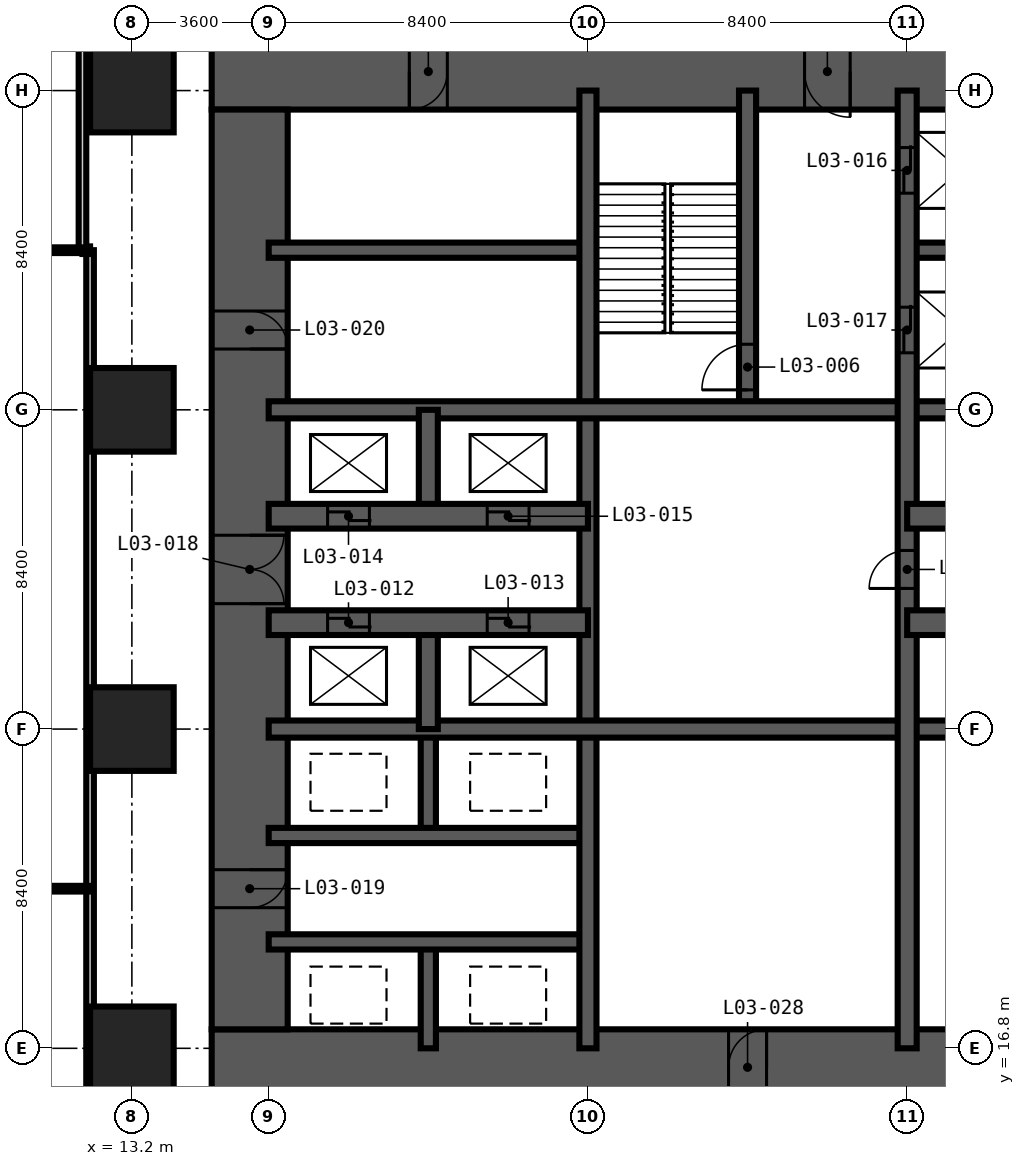
"""IFC4 building model, lengths in metres.
Left out: names, types, materials, properties, quantities, classifications, styles, units other than length and angle.
Written with IfcOpenShell. Run it as: python <this file> out.ifc"""

import sys

from ifc_helpers import new_model, si_unit, direction, frame, frame_2d, origin, origin_2d, place, context, subcontext, project, spatial, rectangle, extrude, element, fill, save


model = new_model("IFC4")
c1 = context("Model", 3, precision=1e-05, world=origin(), true_north=direction((0.0, 1.0)))
c2 = subcontext(c1, "Body", "Model", "MODEL_VIEW")
j1 = project(units=[si_unit("LENGTHUNIT", "METRE"), si_unit("PLANEANGLEUNIT", "RADIAN")], contexts=[c1])
p1 = place(None, origin())
s1 = spatial("IfcSite", under=j1, at=p1, CompositionType="ELEMENT")
p2 = place(p1, origin())
s2 = spatial("IfcBuilding", under=s1, at=p2, CompositionType="ELEMENT")
p3 = place(p2, frame((0.0, 0.0, 17.0)))
s3 = spatial("IfcBuildingStorey", under=s2, at=p3, CompositionType="ELEMENT", Elevation=17.0)
for number, where, z_axis, x_axis in (
    (1, (13.2, 16.8, -0.3), (0.0, 0.0, 1.0), (1.0, 0.0, 0.0)),
    (2, (13.2, 25.2, -0.3), (0.0, 0.0, 1.0), (1.0, 0.0, 0.0)),
    (3, (13.2, 33.6, -0.3), (0.0, 0.0, 1.0), (1.0, 0.0, 0.0)),
    (4, (13.2, 42.0, -0.3), (0.0, 0.0, 1.0), (1.0, 0.0, 0.0)),
):
    element("IfcColumn", number, at=place(p3, frame(where, z_axis=z_axis, x_axis=x_axis)), inside=s3, PredefinedType="COLUMN", context=c2, shape_type="SweptSolid", body=[
        extrude(rectangle(XDim=2.2, YDim=2.2, at=origin_2d()), origin(), (0.0, 0.0, 1.0), 4.95),
    ])
p4 = place(p3, frame((15.3, 16.3, -0.3), z_axis=(0.0, 0.0, 1.0), x_axis=(1.0, 0.0, 0.0)))
e5 = element("IfcWall", 5, at=p4, inside=s3, PredefinedType="SHEAR", context=c2, shape_type="SweptSolid", body=[
    extrude(rectangle(XDim=28.2, YDim=2.0, at=frame_2d((14.1, 0.0))), origin(), (0.0, 0.0, 1.0), 4.95),
])
p5 = place(p4, frame((13.6, 0.0, 0.3)))
e6 = element("IfcOpeningElement", 6, at=p5, cuts=e5, PredefinedType="OPENING", context=c2, shape_type="SweptSolid", body=[
    extrude(rectangle(XDim=1.0, YDim=2.1, at=frame_2d((0.5, 1.05))), frame((0.0, 1.01, 0.0), z_axis=(0.0, -1.0, 0.0), x_axis=(1.0, 0.0, 0.0)), (0.0, 0.0, 1.0), 2.02),
])
p6 = place(p4, frame((19.9, 0.0, 0.3)))
e7 = element("IfcOpeningElement", 7, at=p6, cuts=e5, PredefinedType="OPENING", context=c2, shape_type="SweptSolid", body=[
    extrude(rectangle(XDim=1.0, YDim=2.1, at=frame_2d((0.5, 1.05))), frame((0.0, 1.01, 0.0), z_axis=(0.0, -1.0, 0.0), x_axis=(1.0, 0.0, 0.0)), (0.0, 0.0, 1.0), 2.02),
])
p7 = place(p3, frame((43.5, 42.5, -0.3), z_axis=(0.0, 0.0, 1.0), x_axis=(-1.0, 0.0, 0.0)))
e8 = element("IfcWall", 8, at=p7, inside=s3, PredefinedType="SHEAR", context=c2, shape_type="SweptSolid", body=[
    extrude(rectangle(XDim=28.2, YDim=2.0, at=frame_2d((14.1, 0.0))), origin(), (0.0, 0.0, 1.0), 4.95),
])
p8 = place(p7, frame((22.0, 0.0, 0.3)))
e9 = element("IfcOpeningElement", 9, at=p8, cuts=e8, PredefinedType="OPENING", context=c2, shape_type="SweptSolid", body=[
    extrude(rectangle(XDim=1.0, YDim=2.1, at=frame_2d((0.5, 1.05))), frame((0.0, 1.01, 0.0), z_axis=(0.0, -1.0, 0.0), x_axis=(1.0, 0.0, 0.0)), (0.0, 0.0, 1.0), 2.02),
])
p9 = place(p7, frame((11.4, 0.0, 0.3)))
e10 = element("IfcOpeningElement", 10, at=p9, cuts=e8, PredefinedType="OPENING", context=c2, shape_type="SweptSolid", body=[
    extrude(rectangle(XDim=1.2, YDim=2.2, at=frame_2d((0.6, 1.1))), frame((0.0, 1.01, 0.0), z_axis=(0.0, -1.0, 0.0), x_axis=(1.0, 0.0, 0.0)), (0.0, 0.0, 1.0), 2.02),
])
p10 = place(p3, frame((16.3, 41.5, -0.3), z_axis=(0.0, 0.0, 1.0), x_axis=(0.0, -1.0, 0.0)))
e11 = element("IfcWall", 11, at=p10, inside=s3, PredefinedType="SHEAR", context=c2, shape_type="SweptSolid", body=[
    extrude(rectangle(XDim=24.2, YDim=2.0, at=frame_2d((12.1, 0.0))), origin(), (0.0, 0.0, 1.0), 4.95),
])
p11 = place(p10, frame((11.2, 0.0, 0.3)))
e12 = element("IfcOpeningElement", 12, at=p11, cuts=e11, PredefinedType="OPENING", context=c2, shape_type="SweptSolid", body=[
    extrude(rectangle(XDim=1.8, YDim=2.2, at=frame_2d((0.9, 1.1))), frame((0.0, 1.01, 0.0), z_axis=(0.0, -1.0, 0.0), x_axis=(1.0, 0.0, 0.0)), (0.0, 0.0, 1.0), 2.02),
])
p12 = place(p10, frame((20.0, 0.0, 0.3)))
e13 = element("IfcOpeningElement", 13, at=p12, cuts=e11, PredefinedType="OPENING", context=c2, shape_type="SweptSolid", body=[
    extrude(rectangle(XDim=1.0, YDim=2.1, at=frame_2d((0.5, 1.05))), frame((0.0, 1.01, 0.0), z_axis=(0.0, -1.0, 0.0), x_axis=(1.0, 0.0, 0.0)), (0.0, 0.0, 1.0), 2.02),
])
p13 = place(p10, frame((5.3, 0.0, 0.3)))
e14 = element("IfcOpeningElement", 14, at=p13, cuts=e11, PredefinedType="OPENING", context=c2, shape_type="SweptSolid", body=[
    extrude(rectangle(XDim=1.0, YDim=2.1, at=frame_2d((0.5, 1.05))), frame((0.0, 1.01, 0.0), z_axis=(0.0, -1.0, 0.0), x_axis=(1.0, 0.0, 0.0)), (0.0, 0.0, 1.0), 2.02),
])
for number, where, z_axis, x_axis in (
    (15, (21.0, 16.8, -0.3), (0.0, 0.0, 1.0), (0.0, 1.0, 0.0)),
    (16, (21.0, 22.4, -0.3), (0.0, 0.0, 1.0), (0.0, 1.0, 0.0)),
):
    element("IfcWall", number, at=place(p3, frame(where, z_axis=z_axis, x_axis=x_axis)), inside=s3, PredefinedType="SHEAR", context=c2, shape_type="SweptSolid", body=[
        extrude(rectangle(XDim=2.8, YDim=0.4, at=frame_2d((1.4, 0.0))), origin(), (0.0, 0.0, 1.0), 4.95),
    ])
for number, where, z_axis, x_axis in (
    (17, (16.8, 19.6, -0.3), (0.0, 0.0, 1.0), (1.0, 0.0, 0.0)),
    (18, (16.8, 22.4, -0.3), (0.0, 0.0, 1.0), (1.0, 0.0, 0.0)),
    (19, (16.8, 37.8, -0.3), (0.0, 0.0, 1.0), (1.0, 0.0, 0.0)),
):
    element("IfcWall", number, at=place(p3, frame(where, z_axis=z_axis, x_axis=x_axis)), inside=s3, PredefinedType="SHEAR", context=c2, shape_type="SweptSolid", body=[
        extrude(rectangle(XDim=8.4, YDim=0.4, at=frame_2d((4.2, 0.0))), origin(), (0.0, 0.0, 1.0), 4.95),
    ])
p14 = place(p3, frame((33.6, 37.8, -0.3), z_axis=(0.0, 0.0, 1.0), x_axis=(1.0, 0.0, 0.0)))
e20 = element("IfcWall", 20, at=p14, inside=s3, PredefinedType="SHEAR", context=c2, shape_type="SweptSolid", body=[
    extrude(rectangle(XDim=2.8, YDim=0.4, at=frame_2d((1.4, 0.0))), origin(), (0.0, 0.0, 1.0), 4.95),
])
p15 = place(p3, frame((25.2, 16.8, -0.3), z_axis=(0.0, 0.0, 1.0), x_axis=(0.0, 1.0, 0.0)))
e21 = element("IfcWall", 21, at=p15, inside=s3, PredefinedType="SHEAR", context=c2, shape_type="SweptSolid", body=[
    extrude(rectangle(XDim=25.2, YDim=0.45, at=frame_2d((12.6, 0.0))), origin(), (0.0, 0.0, 1.0), 4.95),
])
p16 = place(p3, frame((29.4, 33.6, -0.3), z_axis=(0.0, 0.0, 1.0), x_axis=(0.0, 1.0, 0.0)))
e22 = element("IfcWall", 22, at=p16, inside=s3, PredefinedType="SHEAR", context=c2, shape_type="SweptSolid", body=[
    extrude(rectangle(XDim=8.4, YDim=0.45, at=frame_2d((4.2, 0.0))), origin(), (0.0, 0.0, 1.0), 4.95),
])
p17 = place(p16, frame((0.525, 0.0, 0.3)))
e23 = element("IfcOpeningElement", 23, at=p17, cuts=e22, PredefinedType="OPENING", context=c2, shape_type="SweptSolid", body=[
    extrude(rectangle(XDim=1.2, YDim=2.2, at=frame_2d((0.6, 1.1))), frame((0.0, 0.235, 0.0), z_axis=(0.0, -1.0, 0.0), x_axis=(1.0, 0.0, 0.0)), (0.0, 0.0, 1.0), 0.47),
])
for number, where, z_axis, x_axis in (
    (24, (16.8, 25.2, -0.3), (0.0, 0.0, 1.0), (1.0, 0.0, 0.0)),
    (25, (16.8, 33.6, -0.3), (0.0, 0.0, 1.0), (1.0, 0.0, 0.0)),
):
    element("IfcWall", number, at=place(p3, frame(where, z_axis=z_axis, x_axis=x_axis)), inside=s3, PredefinedType="SHEAR", context=c2, shape_type="SweptSolid", body=[
        extrude(rectangle(XDim=25.2, YDim=0.45, at=frame_2d((12.6, 0.0))), origin(), (0.0, 0.0, 1.0), 4.95),
    ])
for number, where, z_axis, x_axis in (
    (26, (21.0, 25.2, -0.3), (0.0, 0.0, 1.0), (0.0, 1.0, 0.0)),
    (27, (21.0, 30.8, -0.3), (0.0, 0.0, 1.0), (0.0, 1.0, 0.0)),
):
    element("IfcWall", number, at=place(p3, frame(where, z_axis=z_axis, x_axis=x_axis)), inside=s3, PredefinedType="SHEAR", context=c2, shape_type="SweptSolid", body=[
        extrude(rectangle(XDim=2.8, YDim=0.5, at=frame_2d((1.4, 0.0))), origin(), (0.0, 0.0, 1.0), 4.95),
    ])
p18 = place(p3, frame((33.6, 16.8, -0.3), z_axis=(0.0, 0.0, 1.0), x_axis=(0.0, 1.0, 0.0)))
e28 = element("IfcWall", 28, at=p18, inside=s3, PredefinedType="SHEAR", context=c2, shape_type="SweptSolid", body=[
    extrude(rectangle(XDim=25.2, YDim=0.5, at=frame_2d((12.6, 0.0))), origin(), (0.0, 0.0, 1.0), 4.95),
])
p19 = place(p18, frame((22.5, 0.0, 0.3)))
e29 = element("IfcOpeningElement", 29, at=p19, cuts=e28, PredefinedType="OPENING", context=c2, shape_type="SweptSolid", body=[
    extrude(rectangle(XDim=1.2, YDim=2.2, at=frame_2d((0.6, 1.1))), frame((0.0, 0.26, 0.0), z_axis=(0.0, -1.0, 0.0), x_axis=(1.0, 0.0, 0.0)), (0.0, 0.0, 1.0), 0.52),
])
p20 = place(p18, frame((18.3, 0.0, 0.3)))
e30 = element("IfcOpeningElement", 30, at=p20, cuts=e28, PredefinedType="OPENING", context=c2, shape_type="SweptSolid", body=[
    extrude(rectangle(XDim=1.2, YDim=2.2, at=frame_2d((0.6, 1.1))), frame((0.0, 0.26, 0.0), z_axis=(0.0, -1.0, 0.0), x_axis=(1.0, 0.0, 0.0)), (0.0, 0.0, 1.0), 0.52),
])
p21 = place(p18, frame((12.1, 0.0, 0.3)))
e31 = element("IfcOpeningElement", 31, at=p21, cuts=e28, PredefinedType="OPENING", context=c2, shape_type="SweptSolid", body=[
    extrude(rectangle(XDim=1.0, YDim=2.1, at=frame_2d((0.5, 1.05))), frame((0.0, 0.26, 0.0), z_axis=(0.0, -1.0, 0.0), x_axis=(1.0, 0.0, 0.0)), (0.0, 0.0, 1.0), 0.52),
])
p22 = place(p3, frame((16.8, 28.0, -0.3), z_axis=(0.0, 0.0, 1.0), x_axis=(1.0, 0.0, 0.0)))
e32 = element("IfcWall", 32, at=p22, inside=s3, PredefinedType="SHEAR", context=c2, shape_type="SweptSolid", body=[
    extrude(rectangle(XDim=8.4, YDim=0.65, at=frame_2d((4.2, 0.0))), origin(), (0.0, 0.0, 1.0), 4.95),
])
p23 = place(p22, frame((1.55, 0.0, 0.3)))
e33 = element("IfcOpeningElement", 33, at=p23, cuts=e32, PredefinedType="OPENING", context=c2, shape_type="SweptSolid", body=[
    extrude(rectangle(XDim=1.1, YDim=2.2, at=frame_2d((0.55, 1.1))), frame((0.0, 0.335, 0.0), z_axis=(0.0, -1.0, 0.0), x_axis=(1.0, 0.0, 0.0)), (0.0, 0.0, 1.0), 0.67),
])
p24 = place(p22, frame((5.75, 0.0, 0.3)))
e34 = element("IfcOpeningElement", 34, at=p24, cuts=e32, PredefinedType="OPENING", context=c2, shape_type="SweptSolid", body=[
    extrude(rectangle(XDim=1.1, YDim=2.2, at=frame_2d((0.55, 1.1))), frame((0.0, 0.335, 0.0), z_axis=(0.0, -1.0, 0.0), x_axis=(1.0, 0.0, 0.0)), (0.0, 0.0, 1.0), 0.67),
])
p25 = place(p3, frame((33.6, 28.0, -0.3), z_axis=(0.0, 0.0, 1.0), x_axis=(1.0, 0.0, 0.0)))
e35 = element("IfcWall", 35, at=p25, inside=s3, PredefinedType="SHEAR", context=c2, shape_type="SweptSolid", body=[
    extrude(rectangle(XDim=8.4, YDim=0.65, at=frame_2d((4.2, 0.0))), origin(), (0.0, 0.0, 1.0), 4.95),
])
p26 = place(p3, frame((16.8, 30.8, -0.3), z_axis=(0.0, 0.0, 1.0), x_axis=(1.0, 0.0, 0.0)))
e36 = element("IfcWall", 36, at=p26, inside=s3, PredefinedType="SHEAR", context=c2, shape_type="SweptSolid", body=[
    extrude(rectangle(XDim=8.4, YDim=0.65, at=frame_2d((4.2, 0.0))), origin(), (0.0, 0.0, 1.0), 4.95),
])
p27 = place(p26, frame((1.55, 0.0, 0.3)))
e37 = element("IfcOpeningElement", 37, at=p27, cuts=e36, PredefinedType="OPENING", context=c2, shape_type="SweptSolid", body=[
    extrude(rectangle(XDim=1.1, YDim=2.2, at=frame_2d((0.55, 1.1))), frame((0.0, 0.335, 0.0), z_axis=(0.0, -1.0, 0.0), x_axis=(1.0, 0.0, 0.0)), (0.0, 0.0, 1.0), 0.67),
])
p28 = place(p26, frame((5.75, 0.0, 0.3)))
e38 = element("IfcOpeningElement", 38, at=p28, cuts=e36, PredefinedType="OPENING", context=c2, shape_type="SweptSolid", body=[
    extrude(rectangle(XDim=1.1, YDim=2.2, at=frame_2d((0.55, 1.1))), frame((0.0, 0.335, 0.0), z_axis=(0.0, -1.0, 0.0), x_axis=(1.0, 0.0, 0.0)), (0.0, 0.0, 1.0), 0.67),
])
p29 = place(p3, frame((33.6, 30.8, -0.3), z_axis=(0.0, 0.0, 1.0), x_axis=(1.0, 0.0, 0.0)))
e39 = element("IfcWall", 39, at=p29, inside=s3, PredefinedType="SHEAR", context=c2, shape_type="SweptSolid", body=[
    extrude(rectangle(XDim=8.4, YDim=0.65, at=frame_2d((4.2, 0.0))), origin(), (0.0, 0.0, 1.0), 4.95),
])
p30 = place(p29, frame((1.6, 0.0, 0.3)))
e40 = element("IfcOpeningElement", 40, at=p30, cuts=e39, PredefinedType="OPENING", context=c2, shape_type="SweptSolid", body=[
    extrude(rectangle(XDim=1.0, YDim=2.1, at=frame_2d((0.5, 1.05))), frame((0.0, 0.335, 0.0), z_axis=(0.0, -1.0, 0.0), x_axis=(1.0, 0.0, 0.0)), (0.0, 0.0, 1.0), 0.67),
])
p31 = place(p29, frame((4.6, 0.0, 0.3)))
e41 = element("IfcOpeningElement", 41, at=p31, cuts=e39, PredefinedType="OPENING", context=c2, shape_type="SweptSolid", body=[
    extrude(rectangle(XDim=1.0, YDim=2.1, at=frame_2d((0.5, 1.05))), frame((0.0, 0.335, 0.0), z_axis=(0.0, -1.0, 0.0), x_axis=(1.0, 0.0, 0.0)), (0.0, 0.0, 1.0), 0.67),
])
p32 = place(p3, frame((12.1, 14.7, 0.0), z_axis=(0.0, 0.0, 1.0), x_axis=(0.0, 1.0, 0.0)))
e42 = element("IfcWall", 42, at=p32, inside=s3, PredefinedType="PARTITIONING", context=c2, shape_type="SweptSolid", body=[
    extrude(rectangle(XDim=23.1, YDim=0.2, at=frame_2d((11.55, 0.0))), origin(), (0.0, 0.0, 1.0), 4.65),
])
p33 = place(p3, frame((11.9, 37.8, 0.0), z_axis=(0.0, 0.0, 1.0), x_axis=(1.0, 0.0, 0.0)))
e43 = element("IfcWall", 43, at=p33, inside=s3, PredefinedType="PARTITIONING", context=c2, shape_type="SweptSolid", body=[
    extrude(rectangle(XDim=0.2, YDim=0.2, at=frame_2d((0.1, 0.0))), origin(), (0.0, 0.0, 1.0), 4.65),
])
p34 = place(p3, frame((11.9, 58.823, 0.0), z_axis=(0.0, 0.0, 1.0), x_axis=(0.0, -1.0, 0.0)))
e44 = element("IfcWall", 44, at=p34, inside=s3, PredefinedType="PARTITIONING", context=c2, shape_type="SweptSolid", body=[
    extrude(rectangle(XDim=21.023, YDim=0.2, at=frame_2d((10.511, 0.0))), origin(), (0.0, 0.0, 1.0), 4.65),
])
p35 = place(p34, frame((9.623, 0.0, 0.0)))
e45 = element("IfcOpeningElement", 45, at=p35, cuts=e44, PredefinedType="OPENING", context=c2, shape_type="SweptSolid", body=[
    extrude(rectangle(XDim=1.8, YDim=2.4, at=frame_2d((0.9, 1.2))), frame((0.0, 0.11, 0.0), z_axis=(0.0, -1.0, 0.0), x_axis=(1.0, 0.0, 0.0)), (0.0, 0.0, 1.0), 0.22),
])
p36 = place(p3, frame((0.0, 21.0, 0.0), z_axis=(0.0, 0.0, 1.0), x_axis=(1.0, 0.0, 0.0)))
e46 = element("IfcWall", 46, at=p36, inside=s3, PredefinedType="PARTITIONING", context=c2, shape_type="SweptSolid", body=[
    extrude(rectangle(XDim=12.1, YDim=0.15, at=frame_2d((6.05, 0.0))), origin(), (0.0, 0.0, 1.0), 4.65),
])
p37 = place(p3, frame((0.0, 37.8, 0.0), z_axis=(0.0, 0.0, 1.0), x_axis=(1.0, 0.0, 0.0)))
e47 = element("IfcWall", 47, at=p37, inside=s3, PredefinedType="PARTITIONING", context=c2, shape_type="SweptSolid", body=[
    extrude(rectangle(XDim=11.9, YDim=0.15, at=frame_2d((5.95, 0.0))), origin(), (0.0, 0.0, 1.0), 4.65),
])
p38 = place(p37, frame((5.45, 0.0, 0.0)))
e48 = element("IfcOpeningElement", 48, at=p38, cuts=e47, PredefinedType="OPENING", context=c2, shape_type="SweptSolid", body=[
    extrude(rectangle(XDim=1.0, YDim=2.1, at=frame_2d((0.5, 1.05))), frame((0.0, 0.085, 0.0), z_axis=(0.0, -1.0, 0.0), x_axis=(1.0, 0.0, 0.0)), (0.0, 0.0, 1.0), 0.17),
])
p39 = place(p17, origin())
e49 = element("IfcDoor", 49, at=p39, inside=s3, OperationType="SINGLE_SWING_LEFT", PredefinedType="DOOR", context=c2, shape_type="SweptSolid", body=[
    extrude(rectangle(XDim=1.2, YDim=2.2, at=frame_2d((0.6, 1.1))), frame((0.0, 0.025, 0.0), z_axis=(0.0, -1.0, 0.0), x_axis=(1.0, 0.0, 0.0)), (0.0, 0.0, 1.0), 0.05),
])
fill(e23, e49)
p40 = place(p23, origin())
e50 = element("IfcDoor", 50, at=p40, inside=s3, OperationType="DOUBLE_DOOR_SLIDING", PredefinedType="DOOR", context=c2, shape_type="SweptSolid", body=[
    extrude(rectangle(XDim=1.1, YDim=2.2, at=frame_2d((0.55, 1.1))), frame((0.0, 0.025, 0.0), z_axis=(0.0, -1.0, 0.0), x_axis=(1.0, 0.0, 0.0)), (0.0, 0.0, 1.0), 0.05),
])
fill(e33, e50)
p41 = place(p24, origin())
e51 = element("IfcDoor", 51, at=p41, inside=s3, OperationType="DOUBLE_DOOR_SLIDING", PredefinedType="DOOR", context=c2, shape_type="SweptSolid", body=[
    extrude(rectangle(XDim=1.1, YDim=2.2, at=frame_2d((0.55, 1.1))), frame((0.0, 0.025, 0.0), z_axis=(0.0, -1.0, 0.0), x_axis=(1.0, 0.0, 0.0)), (0.0, 0.0, 1.0), 0.05),
])
fill(e34, e51)
p42 = place(p27, origin())
e52 = element("IfcDoor", 52, at=p42, inside=s3, OperationType="DOUBLE_DOOR_SLIDING", PredefinedType="DOOR", context=c2, shape_type="SweptSolid", body=[
    extrude(rectangle(XDim=1.1, YDim=2.2, at=frame_2d((0.55, 1.1))), frame((0.0, 0.025, 0.0), z_axis=(0.0, -1.0, 0.0), x_axis=(1.0, 0.0, 0.0)), (0.0, 0.0, 1.0), 0.05),
])
fill(e37, e52)
p43 = place(p28, origin())
e53 = element("IfcDoor", 53, at=p43, inside=s3, OperationType="DOUBLE_DOOR_SLIDING", PredefinedType="DOOR", context=c2, shape_type="SweptSolid", body=[
    extrude(rectangle(XDim=1.1, YDim=2.2, at=frame_2d((0.55, 1.1))), frame((0.0, 0.025, 0.0), z_axis=(0.0, -1.0, 0.0), x_axis=(1.0, 0.0, 0.0)), (0.0, 0.0, 1.0), 0.05),
])
fill(e38, e53)
p44 = place(p19, origin())
e54 = element("IfcDoor", 54, at=p44, inside=s3, OperationType="DOUBLE_DOOR_SLIDING", PredefinedType="DOOR", context=c2, shape_type="SweptSolid", body=[
    extrude(rectangle(XDim=1.2, YDim=2.2, at=frame_2d((0.6, 1.1))), frame((0.0, 0.025, 0.0), z_axis=(0.0, -1.0, 0.0), x_axis=(1.0, 0.0, 0.0)), (0.0, 0.0, 1.0), 0.05),
])
fill(e29, e54)
p45 = place(p20, origin())
e55 = element("IfcDoor", 55, at=p45, inside=s3, OperationType="DOUBLE_DOOR_SLIDING", PredefinedType="DOOR", context=c2, shape_type="SweptSolid", body=[
    extrude(rectangle(XDim=1.2, YDim=2.2, at=frame_2d((0.6, 1.1))), frame((0.0, 0.025, 0.0), z_axis=(0.0, -1.0, 0.0), x_axis=(1.0, 0.0, 0.0)), (0.0, 0.0, 1.0), 0.05),
])
fill(e30, e55)
p46 = place(p11, origin())
e56 = element("IfcDoor", 56, at=p46, inside=s3, OperationType="DOUBLE_DOOR_DOUBLE_SWING", PredefinedType="DOOR", context=c2, shape_type="SweptSolid", body=[
    extrude(rectangle(XDim=1.8, YDim=2.2, at=frame_2d((0.9, 1.1))), frame((0.0, 0.025, 0.0), z_axis=(0.0, -1.0, 0.0), x_axis=(1.0, 0.0, 0.0)), (0.0, 0.0, 1.0), 0.05),
])
fill(e12, e56)
p47 = place(p12, origin())
e57 = element("IfcDoor", 57, at=p47, inside=s3, OperationType="SINGLE_SWING_LEFT", PredefinedType="DOOR", context=c2, shape_type="SweptSolid", body=[
    extrude(rectangle(XDim=1.0, YDim=2.1, at=frame_2d((0.5, 1.05))), frame((0.0, 0.025, 0.0), z_axis=(0.0, -1.0, 0.0), x_axis=(1.0, 0.0, 0.0)), (0.0, 0.0, 1.0), 0.05),
])
fill(e13, e57)
p48 = place(p13, origin())
e58 = element("IfcDoor", 58, at=p48, inside=s3, OperationType="SINGLE_SWING_RIGHT", PredefinedType="DOOR", context=c2, shape_type="SweptSolid", body=[
    extrude(rectangle(XDim=1.0, YDim=2.1, at=frame_2d((0.5, 1.05))), frame((0.0, 0.025, 0.0), z_axis=(0.0, -1.0, 0.0), x_axis=(1.0, 0.0, 0.0)), (0.0, 0.0, 1.0), 0.05),
])
fill(e14, e58)
p49 = place(p8, origin())
e59 = element("IfcDoor", 59, at=p49, inside=s3, OperationType="SINGLE_SWING_RIGHT", PredefinedType="DOOR", context=c2, shape_type="SweptSolid", body=[
    extrude(rectangle(XDim=1.0, YDim=2.1, at=frame_2d((0.5, 1.05))), frame((0.0, 0.025, 0.0), z_axis=(0.0, -1.0, 0.0), x_axis=(1.0, 0.0, 0.0)), (0.0, 0.0, 1.0), 0.05),
])
fill(e9, e59)
p50 = place(p21, origin())
e60 = element("IfcDoor", 60, at=p50, inside=s3, OperationType="SINGLE_SWING_LEFT", PredefinedType="DOOR", context=c2, shape_type="SweptSolid", body=[
    extrude(rectangle(XDim=1.0, YDim=2.1, at=frame_2d((0.5, 1.05))), frame((0.0, 0.025, 0.0), z_axis=(0.0, -1.0, 0.0), x_axis=(1.0, 0.0, 0.0)), (0.0, 0.0, 1.0), 0.05),
])
fill(e31, e60)
p51 = place(p9, origin())
e61 = element("IfcDoor", 61, at=p51, inside=s3, OperationType="SINGLE_SWING_LEFT", PredefinedType="DOOR", context=c2, shape_type="SweptSolid", body=[
    extrude(rectangle(XDim=1.2, YDim=2.2, at=frame_2d((0.6, 1.1))), frame((0.0, 0.025, 0.0), z_axis=(0.0, -1.0, 0.0), x_axis=(1.0, 0.0, 0.0)), (0.0, 0.0, 1.0), 0.05),
])
fill(e10, e61)
p52 = place(p5, origin())
e62 = element("IfcDoor", 62, at=p52, inside=s3, OperationType="SINGLE_SWING_RIGHT", PredefinedType="DOOR", context=c2, shape_type="SweptSolid", body=[
    extrude(rectangle(XDim=1.0, YDim=2.1, at=frame_2d((0.5, 1.05))), frame((0.0, 0.025, 0.0), z_axis=(0.0, -1.0, 0.0), x_axis=(1.0, 0.0, 0.0)), (0.0, 0.0, 1.0), 0.05),
])
fill(e6, e62)
save(model, sys.argv[1])
